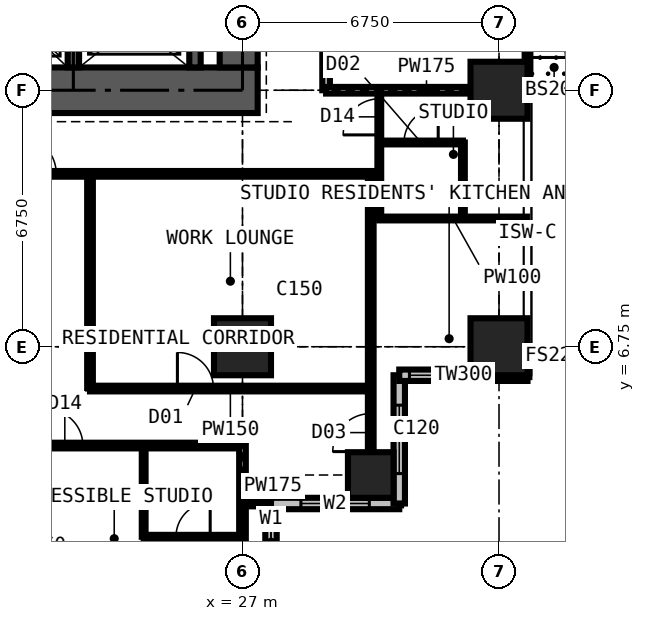
"""IFC4 building model, lengths in metres.
Left out: names, types, materials, properties, quantities, classifications, styles, units other than length and angle.
Written with IfcOpenShell. Run it as: python <this file> out.ifc"""

import sys

from ifc_helpers import new_model, si_unit, direction, frame, frame_2d, origin, origin_2d, place, context, subcontext, project, spatial, rectangle, extrude, element, fill, save


model = new_model("IFC4")
c1 = context("Model", 3, precision=1e-05, world=origin(), true_north=direction((0.0, 1.0)))
c2 = subcontext(c1, "Body", "Model", "MODEL_VIEW")
j1 = project(units=[si_unit("LENGTHUNIT", "METRE"), si_unit("PLANEANGLEUNIT", "RADIAN")], contexts=[c1])
p1 = place(None, origin())
s1 = spatial("IfcSite", under=j1, at=p1, CompositionType="ELEMENT")
p2 = place(p1, origin())
s2 = spatial("IfcBuilding", under=s1, at=p2, CompositionType="ELEMENT")
p3 = place(p2, frame((0.0, 0.0, 149.4)))
s3 = spatial("IfcBuildingStorey", under=s2, at=p3, CompositionType="ELEMENT", Elevation=149.4)
p4 = place(p3, frame((27.0, 6.75, 0.0), z_axis=(0.0, 0.0, 1.0), x_axis=(1.0, 0.0, 0.0)))
e1 = element("IfcColumn", 1, at=p4, inside=s3, PredefinedType="COLUMN", context=c2, shape_type="SweptSolid", body=[
    extrude(rectangle(XDim=1.5, YDim=1.5, at=origin_2d()), origin(), (0.0, 0.0, 1.0), 3.6),
])
p5 = place(p3, frame((30.375, 3.375, 0.0), z_axis=(0.0, 0.0, 1.0), x_axis=(1.0, 0.0, 0.0)))
e2 = element("IfcColumn", 2, at=p5, inside=s3, PredefinedType="COLUMN", context=c2, shape_type="SweptSolid", body=[
    extrude(rectangle(XDim=1.2, YDim=1.2, at=origin_2d()), origin(), (0.0, 0.0, 1.0), 3.6),
])
for number, where, z_axis, x_axis in (
    (3, (33.75, 6.75, 0.0), (0.0, 0.0, 1.0), (1.0, 0.0, 0.0)),
    (4, (33.75, 13.5, 0.0), (0.0, 0.0, 1.0), (1.0, 0.0, 0.0)),
):
    element("IfcColumn", number, at=place(p3, frame(where, z_axis=z_axis, x_axis=x_axis)), inside=s3, PredefinedType="COLUMN", context=c2, shape_type="SweptSolid", body=[
        extrude(rectangle(XDim=1.5, YDim=1.5, at=origin_2d()), origin(), (0.0, 0.0, 1.0), 3.6),
    ])
p6 = place(p3, frame((13.1, 13.5, 0.0), z_axis=(0.0, 0.0, 1.0), x_axis=(1.0, 0.0, 0.0)))
e5 = element("IfcWall", 5, at=p6, inside=s3, PredefinedType="SHEAR", context=c2, shape_type="SweptSolid", body=[
    extrude(rectangle(XDim=14.3, YDim=1.2, at=frame_2d((7.15, 0.0))), origin(), (0.0, 0.0, 1.0), 3.6),
])
p7 = place(p3, frame((26.9, 14.1, 0.0), z_axis=(0.0, 0.0, 1.0), x_axis=(0.0, 1.0, 0.0)))
e6 = element("IfcWall", 6, at=p7, inside=s3, PredefinedType="SHEAR", context=c2, shape_type="SweptSolid", body=[
    extrude(rectangle(XDim=12.3, YDim=1.0, at=frame_2d((6.15, 0.0))), origin(), (0.0, 0.0, 1.0), 3.6),
])
p8 = place(p7, frame((3.65, 0.0, 0.0)))
e7 = element("IfcOpeningElement", 7, at=p8, cuts=e6, PredefinedType="OPENING", context=c2, shape_type="SweptSolid", body=[
    extrude(rectangle(XDim=1.2, YDim=2.2, at=frame_2d((0.6, 1.1))), frame((0.0, 0.51, 0.0), z_axis=(0.0, -1.0, 0.0), x_axis=(1.0, 0.0, 0.0)), (0.0, 0.0, 1.0), 1.02),
])
p9 = place(p3, frame((34.5, 20.25, 0.0), z_axis=(0.0, 0.0, 1.0), x_axis=(0.0, -1.0, 0.0)))
e8 = element("IfcWall", 8, at=p9, inside=s3, PredefinedType="SOLIDWALL", context=c2, shape_type="SweptSolid", body=[
    extrude(rectangle(XDim=6.75, YDim=0.15, at=frame_2d((3.375, 0.0))), origin(), (0.0, 0.0, 1.0), 3.375),
])
p10 = place(p9, frame((0.863, 0.0, 0.0)))
e9 = element("IfcOpeningElement", 9, at=p10, cuts=e8, PredefinedType="OPENING", context=c2, shape_type="SweptSolid", body=[
    extrude(rectangle(XDim=1.0, YDim=2.2, at=frame_2d((0.5, 1.1))), frame((0.0, 0.085, 0.0), z_axis=(0.0, -1.0, 0.0), x_axis=(1.0, 0.0, 0.0)), (0.0, 0.0, 1.0), 0.17),
])
p11 = place(p9, frame((1.975, 0.0, 0.9)))
e10 = element("IfcOpeningElement", 10, at=p11, cuts=e8, PredefinedType="OPENING", context=c2, shape_type="SweptSolid", body=[
    extrude(rectangle(XDim=1.2, YDim=1.8, at=frame_2d((0.6, 0.9))), frame((0.0, 0.085, 0.0), z_axis=(0.0, -1.0, 0.0), x_axis=(1.0, 0.0, 0.0)), (0.0, 0.0, 1.0), 0.17),
])
p12 = place(p9, frame((4.887, 0.0, 0.0)))
e11 = element("IfcOpeningElement", 11, at=p12, cuts=e8, PredefinedType="OPENING", context=c2, shape_type="SweptSolid", body=[
    extrude(rectangle(XDim=1.0, YDim=2.2, at=frame_2d((0.5, 1.1))), frame((0.0, 0.085, 0.0), z_axis=(0.0, -1.0, 0.0), x_axis=(1.0, 0.0, 0.0)), (0.0, 0.0, 1.0), 0.17),
])
p13 = place(p9, frame((3.575, 0.0, 0.9)))
e12 = element("IfcOpeningElement", 12, at=p13, cuts=e8, PredefinedType="OPENING", context=c2, shape_type="SweptSolid", body=[
    extrude(rectangle(XDim=1.2, YDim=1.8, at=frame_2d((0.6, 0.9))), frame((0.0, 0.085, 0.0), z_axis=(0.0, -1.0, 0.0), x_axis=(1.0, 0.0, 0.0)), (0.0, 0.0, 1.0), 0.17),
])
p14 = place(p3, frame((27.75, -0.75, 0.0), z_axis=(0.0, 0.0, 1.0), x_axis=(0.0, 1.0, 0.0)))
e13 = element("IfcWall", 13, at=p14, inside=s3, PredefinedType="SOLIDWALL", context=c2, shape_type="SweptSolid", body=[
    extrude(rectangle(XDim=3.375, YDim=0.3, at=frame_2d((1.688, 0.0))), origin(), (0.0, 0.0, 1.0), 3.375),
])
p15 = place(p14, frame((1.607, 0.0, 0.9)))
e14 = element("IfcOpeningElement", 14, at=p15, cuts=e13, PredefinedType="OPENING", context=c2, shape_type="SweptSolid", body=[
    extrude(rectangle(XDim=1.5, YDim=1.8, at=frame_2d((0.75, 0.9))), frame((0.0, 0.16, 0.0), z_axis=(0.0, -1.0, 0.0), x_axis=(1.0, 0.0, 0.0)), (0.0, 0.0, 1.0), 0.32),
])
p16 = place(p3, frame((27.75, 2.625, 0.0), z_axis=(0.0, 0.0, 1.0), x_axis=(1.0, 0.0, 0.0)))
e15 = element("IfcWall", 15, at=p16, inside=s3, PredefinedType="SOLIDWALL", context=c2, shape_type="SweptSolid", body=[
    extrude(rectangle(XDim=3.375, YDim=0.3, at=frame_2d((1.688, 0.0))), origin(), (0.0, 0.0, 1.0), 3.375),
])
p17 = place(p16, frame((0.788, 0.0, 0.6)))
e16 = element("IfcOpeningElement", 16, at=p17, cuts=e15, PredefinedType="OPENING", context=c2, shape_type="SweptSolid", body=[
    extrude(rectangle(XDim=1.8, YDim=2.1, at=frame_2d((0.9, 1.05))), frame((0.0, 0.16, 0.0), z_axis=(0.0, -1.0, 0.0), x_axis=(1.0, 0.0, 0.0)), (0.0, 0.0, 1.0), 0.32),
])
p18 = place(p3, frame((31.125, 2.625, 0.0), z_axis=(0.0, 0.0, 1.0), x_axis=(0.0, 1.0, 0.0)))
e17 = element("IfcWall", 17, at=p18, inside=s3, PredefinedType="SOLIDWALL", context=c2, shape_type="SweptSolid", body=[
    extrude(rectangle(XDim=3.375, YDim=0.3, at=frame_2d((1.688, 0.0))), origin(), (0.0, 0.0, 1.0), 3.375),
])
p19 = place(p18, frame((0.788, 0.0, 0.6)))
e18 = element("IfcOpeningElement", 18, at=p19, cuts=e17, PredefinedType="OPENING", context=c2, shape_type="SweptSolid", body=[
    extrude(rectangle(XDim=1.8, YDim=2.1, at=frame_2d((0.9, 1.05))), frame((0.0, 0.16, 0.0), z_axis=(0.0, -1.0, 0.0), x_axis=(1.0, 0.0, 0.0)), (0.0, 0.0, 1.0), 0.32),
])
p20 = place(p3, frame((31.125, 6.0, 0.0), z_axis=(0.0, 0.0, 1.0), x_axis=(1.0, 0.0, 0.0)))
e19 = element("IfcWall", 19, at=p20, inside=s3, PredefinedType="SOLIDWALL", context=c2, shape_type="SweptSolid", body=[
    extrude(rectangle(XDim=3.375, YDim=0.3, at=frame_2d((1.688, 0.0))), origin(), (0.0, 0.0, 1.0), 3.375),
])
p21 = place(p20, frame((0.268, 0.0, 0.9)))
e20 = element("IfcOpeningElement", 20, at=p21, cuts=e19, PredefinedType="OPENING", context=c2, shape_type="SweptSolid", body=[
    extrude(rectangle(XDim=1.5, YDim=1.8, at=frame_2d((0.75, 0.9))), frame((0.0, 0.16, 0.0), z_axis=(0.0, -1.0, 0.0), x_axis=(1.0, 0.0, 0.0)), (0.0, 0.0, 1.0), 0.32),
])
for number, where, z_axis, x_axis in (
    (21, (22.55, 14.1, 0.0), (0.0, 0.0, 1.0), (0.0, 1.0, 0.0)),
    (22, (25.75, 14.1, 0.0), (0.0, 0.0, 1.0), (0.0, 1.0, 0.0)),
):
    element("IfcWall", number, at=place(p3, frame(where, z_axis=z_axis, x_axis=x_axis)), inside=s3, PredefinedType="SHEAR", context=c2, shape_type="SweptSolid", body=[
        extrude(rectangle(XDim=2.3, YDim=0.3, at=frame_2d((1.15, 0.0))), origin(), (0.0, 0.0, 1.0), 3.6),
    ])
p22 = place(p3, frame((6.75, 4.15, 0.0), z_axis=(0.0, 0.0, 1.0), x_axis=(1.0, 0.0, 0.0)))
e23 = element("IfcWall", 23, at=p22, inside=s3, PredefinedType="PARTITIONING", context=c2, shape_type="SweptSolid", body=[
    extrude(rectangle(XDim=20.25, YDim=0.15, at=frame_2d((10.125, 0.0))), origin(), (0.0, 0.0, 1.0), 3.375),
])
p23 = place(p22, frame((1.2, 0.0, 0.0)))
e24 = element("IfcOpeningElement", 24, at=p23, cuts=e23, PredefinedType="OPENING", context=c2, shape_type="SweptSolid", body=[
    extrude(rectangle(XDim=1.0, YDim=2.2, at=frame_2d((0.5, 1.1))), frame((0.0, 0.085, 0.0), z_axis=(0.0, -1.0, 0.0), x_axis=(1.0, 0.0, 0.0)), (0.0, 0.0, 1.0), 0.17),
])
p24 = place(p22, frame((3.575, 0.0, 0.0)))
e25 = element("IfcOpeningElement", 25, at=p24, cuts=e23, PredefinedType="OPENING", context=c2, shape_type="SweptSolid", body=[
    extrude(rectangle(XDim=0.95, YDim=2.2, at=frame_2d((0.475, 1.1))), frame((0.0, 0.085, 0.0), z_axis=(0.0, -1.0, 0.0), x_axis=(1.0, 0.0, 0.0)), (0.0, 0.0, 1.0), 0.17),
])
p25 = place(p22, frame((7.0, 0.0, 0.0)))
e26 = element("IfcOpeningElement", 26, at=p25, cuts=e23, PredefinedType="OPENING", context=c2, shape_type="SweptSolid", body=[
    extrude(rectangle(XDim=0.95, YDim=2.2, at=frame_2d((0.475, 1.1))), frame((0.0, 0.085, 0.0), z_axis=(0.0, -1.0, 0.0), x_axis=(1.0, 0.0, 0.0)), (0.0, 0.0, 1.0), 0.17),
])
p26 = place(p22, frame((10.375, 0.0, 0.0)))
e27 = element("IfcOpeningElement", 27, at=p26, cuts=e23, PredefinedType="OPENING", context=c2, shape_type="SweptSolid", body=[
    extrude(rectangle(XDim=0.95, YDim=2.2, at=frame_2d((0.475, 1.1))), frame((0.0, 0.085, 0.0), z_axis=(0.0, -1.0, 0.0), x_axis=(1.0, 0.0, 0.0)), (0.0, 0.0, 1.0), 0.17),
])
p27 = place(p22, frame((15.1, 0.0, 0.0)))
e28 = element("IfcOpeningElement", 28, at=p27, cuts=e23, PredefinedType="OPENING", context=c2, shape_type="SweptSolid", body=[
    extrude(rectangle(XDim=0.95, YDim=2.2, at=frame_2d((0.475, 1.1))), frame((0.0, 0.085, 0.0), z_axis=(0.0, -1.0, 0.0), x_axis=(1.0, 0.0, 0.0)), (0.0, 0.0, 1.0), 0.17),
])
p28 = place(p3, frame((10.125, 11.3, 0.0), z_axis=(0.0, 0.0, 1.0), x_axis=(1.0, 0.0, 0.0)))
e29 = element("IfcWall", 29, at=p28, inside=s3, PredefinedType="PARTITIONING", context=c2, shape_type="SweptSolid", body=[
    extrude(rectangle(XDim=20.475, YDim=0.15, at=frame_2d((10.238, 0.0))), origin(), (0.0, 0.0, 1.0), 3.375),
])
p29 = place(p28, frame((8.425, 0.0, 0.0)))
e30 = element("IfcOpeningElement", 30, at=p29, cuts=e29, PredefinedType="OPENING", context=c2, shape_type="SweptSolid", body=[
    extrude(rectangle(XDim=1.0, YDim=2.2, at=frame_2d((0.5, 1.1))), frame((0.0, 0.085, 0.0), z_axis=(0.0, -1.0, 0.0), x_axis=(1.0, 0.0, 0.0)), (0.0, 0.0, 1.0), 0.17),
])
p30 = place(p28, frame((10.975, 0.0, 0.0)))
e31 = element("IfcOpeningElement", 31, at=p30, cuts=e29, PredefinedType="OPENING", context=c2, shape_type="SweptSolid", body=[
    extrude(rectangle(XDim=1.0, YDim=2.2, at=frame_2d((0.5, 1.1))), frame((0.0, 0.085, 0.0), z_axis=(0.0, -1.0, 0.0), x_axis=(1.0, 0.0, 0.0)), (0.0, 0.0, 1.0), 0.17),
])
p31 = place(p28, frame((4.875, 0.0, 0.0)))
e32 = element("IfcOpeningElement", 32, at=p31, cuts=e29, PredefinedType="OPENING", context=c2, shape_type="SweptSolid", body=[
    extrude(rectangle(XDim=0.95, YDim=2.2, at=frame_2d((0.475, 1.1))), frame((0.0, 0.085, 0.0), z_axis=(0.0, -1.0, 0.0), x_axis=(1.0, 0.0, 0.0)), (0.0, 0.0, 1.0), 0.17),
])
p32 = place(p3, frame((22.988, 5.65, 0.0), z_axis=(0.0, 0.0, 1.0), x_axis=(1.0, 0.0, 0.0)))
e33 = element("IfcWall", 33, at=p32, inside=s3, PredefinedType="PARTITIONING", context=c2, shape_type="SweptSolid", body=[
    extrude(rectangle(XDim=7.387, YDim=0.15, at=frame_2d((3.694, 0.0))), origin(), (0.0, 0.0, 1.0), 3.375),
])
p33 = place(p32, frame((2.3, 0.0, 0.0)))
e34 = element("IfcOpeningElement", 34, at=p33, cuts=e33, PredefinedType="OPENING", context=c2, shape_type="SweptSolid", body=[
    extrude(rectangle(XDim=0.95, YDim=2.2, at=frame_2d((0.475, 1.1))), frame((0.0, 0.085, 0.0), z_axis=(0.0, -1.0, 0.0), x_axis=(1.0, 0.0, 0.0)), (0.0, 0.0, 1.0), 0.17),
])
p34 = place(p3, frame((22.988, 5.65, 0.0), z_axis=(0.0, 0.0, 1.0), x_axis=(0.0, 1.0, 0.0)))
e35 = element("IfcWall", 35, at=p34, inside=s3, PredefinedType="PARTITIONING", context=c2, shape_type="SweptSolid", body=[
    extrude(rectangle(XDim=5.65, YDim=0.15, at=frame_2d((2.825, 0.0))), origin(), (0.0, 0.0, 1.0), 3.375),
])
p35 = place(p3, frame((24.4, 1.75, 0.0), z_axis=(0.0, 0.0, 1.0), x_axis=(0.0, 1.0, 0.0)))
e36 = element("IfcWall", 36, at=p35, inside=s3, PredefinedType="PARTITIONING", context=c2, shape_type="SweptSolid", body=[
    extrude(rectangle(XDim=2.4, YDim=0.1, at=frame_2d((1.2, 0.0))), origin(), (0.0, 0.0, 1.0), 3.375),
])
p36 = place(p3, frame((24.4, 1.75, 0.0), z_axis=(0.0, 0.0, 1.0), x_axis=(1.0, 0.0, 0.0)))
e37 = element("IfcWall", 37, at=p36, inside=s3, PredefinedType="PARTITIONING", context=c2, shape_type="SweptSolid", body=[
    extrude(rectangle(XDim=2.6, YDim=0.1, at=frame_2d((1.3, 0.0))), origin(), (0.0, 0.0, 1.0), 3.375),
])
p37 = place(p36, frame((0.85, 0.0, 0.0)))
e38 = element("IfcOpeningElement", 38, at=p37, cuts=e37, PredefinedType="OPENING", context=c2, shape_type="SweptSolid", body=[
    extrude(rectangle(XDim=0.9, YDim=2.2, at=frame_2d((0.45, 1.1))), frame((0.0, 0.06, 0.0), z_axis=(0.0, -1.0, 0.0), x_axis=(1.0, 0.0, 0.0)), (0.0, 0.0, 1.0), 0.12),
])
p38 = place(p3, frame((27.0, -0.734, 0.0), z_axis=(0.0, 0.0, 1.0), x_axis=(0.0, 1.0, 0.0)))
e39 = element("IfcWall", 39, at=p38, inside=s3, PredefinedType="PARTITIONING", context=c2, shape_type="SweptSolid", body=[
    extrude(rectangle(XDim=4.884, YDim=0.175, at=frame_2d((2.442, 0.0))), origin(), (0.0, 0.0, 1.0), 2.877),
])
p39 = place(p3, frame((27.0, 2.625, 0.0), z_axis=(0.0, 0.0, 1.0), x_axis=(1.0, 0.0, 0.0)))
e40 = element("IfcWall", 40, at=p39, inside=s3, PredefinedType="PARTITIONING", context=c2, shape_type="SweptSolid", body=[
    extrude(rectangle(XDim=0.734, YDim=0.15, at=frame_2d((0.367, 0.0))), origin(), (0.0, 0.0, 1.0), 3.375),
])
p40 = place(p3, frame((29.2, 13.5, 0.0), z_axis=(0.0, 0.0, 1.0), x_axis=(0.0, 1.0, 0.0)))
e41 = element("IfcWall", 41, at=p40, inside=s3, PredefinedType="PARTITIONING", context=c2, shape_type="SweptSolid", body=[
    extrude(rectangle(XDim=15.7, YDim=0.2, at=frame_2d((7.85, 0.0))), origin(), (0.0, 0.0, 1.0), 3.375),
])
p41 = place(p40, frame((8.35, 0.0, 0.0)))
e42 = element("IfcOpeningElement", 42, at=p41, cuts=e41, PredefinedType="OPENING", context=c2, shape_type="SweptSolid", body=[
    extrude(rectangle(XDim=0.95, YDim=2.2, at=frame_2d((0.475, 1.1))), frame((0.0, 0.11, 0.0), z_axis=(0.0, -1.0, 0.0), x_axis=(1.0, 0.0, 0.0)), (0.0, 0.0, 1.0), 0.22),
])
p42 = place(p40, frame((1.6, 0.0, 0.0)))
e43 = element("IfcOpeningElement", 43, at=p42, cuts=e41, PredefinedType="OPENING", context=c2, shape_type="SweptSolid", body=[
    extrude(rectangle(XDim=0.95, YDim=2.2, at=frame_2d((0.475, 1.1))), frame((0.0, 0.11, 0.0), z_axis=(0.0, -1.0, 0.0), x_axis=(1.0, 0.0, 0.0)), (0.0, 0.0, 1.0), 0.22),
])
p43 = place(p40, frame((14.1, 0.0, 0.0)))
e44 = element("IfcOpeningElement", 44, at=p43, cuts=e41, PredefinedType="OPENING", context=c2, shape_type="SweptSolid", body=[
    extrude(rectangle(XDim=1.0, YDim=2.2, at=frame_2d((0.5, 1.1))), frame((0.0, 0.11, 0.0), z_axis=(0.0, -1.0, 0.0), x_axis=(1.0, 0.0, 0.0)), (0.0, 0.0, 1.0), 0.22),
])
p44 = place(p3, frame((29.2, 13.5, 0.0), z_axis=(0.0, 0.0, 1.0), x_axis=(1.0, 0.0, 0.0)))
e45 = element("IfcWall", 45, at=p44, inside=s3, PredefinedType="PARTITIONING", context=c2, shape_type="SweptSolid", body=[
    extrude(rectangle(XDim=5.284, YDim=0.175, at=frame_2d((2.642, 0.0))), origin(), (0.0, 0.0, 1.0), 2.806),
])
p45 = place(p3, frame((30.375, 2.775, 0.0), z_axis=(0.0, 0.0, 1.0), x_axis=(0.0, 1.0, 0.0)))
e46 = element("IfcWall", 46, at=p45, inside=s3, PredefinedType="PARTITIONING", context=c2, shape_type="SweptSolid", body=[
    extrude(rectangle(XDim=8.525, YDim=0.15, at=frame_2d((4.263, 0.0))), origin(), (0.0, 0.0, 1.0), 2.877),
])
p46 = place(p45, frame((1.216, 0.0, 0.0)))
e47 = element("IfcOpeningElement", 47, at=p46, cuts=e46, PredefinedType="OPENING", context=c2, shape_type="SweptSolid", body=[
    extrude(rectangle(XDim=1.0, YDim=2.2, at=frame_2d((0.5, 1.1))), frame((0.0, 0.085, 0.0), z_axis=(0.0, -1.0, 0.0), x_axis=(1.0, 0.0, 0.0)), (0.0, 0.0, 1.0), 0.17),
])
p47 = place(p3, frame((30.6, 10.125, 0.0), z_axis=(0.0, 0.0, 1.0), x_axis=(0.0, 1.0, 0.0)))
e48 = element("IfcWall", 48, at=p47, inside=s3, PredefinedType="PARTITIONING", context=c2, shape_type="SweptSolid", body=[
    extrude(rectangle(XDim=3.375, YDim=0.1, at=frame_2d((1.688, 0.0))), origin(), (0.0, 0.0, 1.0), 3.375),
])
p48 = place(p47, frame((2.2, 0.0, 0.0)))
e49 = element("IfcOpeningElement", 49, at=p48, cuts=e48, PredefinedType="OPENING", context=c2, shape_type="SweptSolid", body=[
    extrude(rectangle(XDim=0.95, YDim=2.2, at=frame_2d((0.475, 1.1))), frame((0.0, 0.06, 0.0), z_axis=(0.0, -1.0, 0.0), x_axis=(1.0, 0.0, 0.0)), (0.0, 0.0, 1.0), 0.12),
])
p49 = place(p3, frame((30.6, 10.125, 0.0), z_axis=(0.0, 0.0, 1.0), x_axis=(1.0, 0.0, 0.0)))
e50 = element("IfcWall", 50, at=p49, inside=s3, PredefinedType="PARTITIONING", context=c2, shape_type="SweptSolid", body=[
    extrude(rectangle(XDim=3.884, YDim=0.1, at=frame_2d((1.942, 0.0))), origin(), (0.0, 0.0, 1.0), 3.375),
])
p50 = place(p3, frame((30.6, 12.125, 0.0), z_axis=(0.0, 0.0, 1.0), x_axis=(1.0, 0.0, 0.0)))
e51 = element("IfcWall", 51, at=p50, inside=s3, PredefinedType="PARTITIONING", context=c2, shape_type="SweptSolid", body=[
    extrude(rectangle(XDim=2.2, YDim=0.1, at=frame_2d((1.1, 0.0))), origin(), (0.0, 0.0, 1.0), 3.375),
])
p51 = place(p50, frame((0.65, 0.0, 0.0)))
e52 = element("IfcOpeningElement", 52, at=p51, cuts=e51, PredefinedType="OPENING", context=c2, shape_type="SweptSolid", body=[
    extrude(rectangle(XDim=0.9, YDim=2.2, at=frame_2d((0.45, 1.1))), frame((0.0, 0.06, 0.0), z_axis=(0.0, -1.0, 0.0), x_axis=(1.0, 0.0, 0.0)), (0.0, 0.0, 1.0), 0.12),
])
p52 = place(p3, frame((32.8, 10.125, 0.0), z_axis=(0.0, 0.0, 1.0), x_axis=(0.0, 1.0, 0.0)))
e53 = element("IfcWall", 53, at=p52, inside=s3, PredefinedType="PARTITIONING", context=c2, shape_type="SweptSolid", body=[
    extrude(rectangle(XDim=2.0, YDim=0.1, at=frame_2d((1.0, 0.0))), origin(), (0.0, 0.0, 1.0), 3.375),
])
p53 = place(p12, origin())
e54 = element("IfcDoor", 54, at=p53, inside=s3, OperationType="SINGLE_SWING_RIGHT", PredefinedType="DOOR", context=c2, shape_type="SweptSolid", body=[
    extrude(rectangle(XDim=1.0, YDim=2.2, at=frame_2d((0.5, 1.1))), frame((0.0, 0.025, 0.0), z_axis=(0.0, -1.0, 0.0), x_axis=(1.0, 0.0, 0.0)), (0.0, 0.0, 1.0), 0.05),
])
fill(e11, e54)
p54 = place(p15, origin())
e55 = element("IfcWindow", 55, at=p54, inside=s3, PartitioningType="SINGLE_PANEL", PredefinedType="WINDOW", context=c2, shape_type="SweptSolid", body=[
    extrude(rectangle(XDim=1.5, YDim=1.8, at=frame_2d((0.75, 0.9))), frame((0.0, 0.03, 0.0), z_axis=(0.0, -1.0, 0.0), x_axis=(1.0, 0.0, 0.0)), (0.0, 0.0, 1.0), 0.06),
])
fill(e14, e55)
p55 = place(p17, origin())
e56 = element("IfcWindow", 56, at=p55, inside=s3, PartitioningType="SINGLE_PANEL", PredefinedType="WINDOW", context=c2, shape_type="SweptSolid", body=[
    extrude(rectangle(XDim=1.8, YDim=2.1, at=frame_2d((0.9, 1.05))), frame((0.0, 0.03, 0.0), z_axis=(0.0, -1.0, 0.0), x_axis=(1.0, 0.0, 0.0)), (0.0, 0.0, 1.0), 0.06),
])
fill(e16, e56)
p56 = place(p19, origin())
e57 = element("IfcWindow", 57, at=p56, inside=s3, PartitioningType="SINGLE_PANEL", PredefinedType="WINDOW", context=c2, shape_type="SweptSolid", body=[
    extrude(rectangle(XDim=1.8, YDim=2.1, at=frame_2d((0.9, 1.05))), frame((0.0, 0.03, 0.0), z_axis=(0.0, -1.0, 0.0), x_axis=(1.0, 0.0, 0.0)), (0.0, 0.0, 1.0), 0.06),
])
fill(e18, e57)
p57 = place(p21, origin())
e58 = element("IfcWindow", 58, at=p57, inside=s3, PartitioningType="SINGLE_PANEL", PredefinedType="WINDOW", context=c2, shape_type="SweptSolid", body=[
    extrude(rectangle(XDim=1.5, YDim=1.8, at=frame_2d((0.75, 0.9))), frame((0.0, 0.03, 0.0), z_axis=(0.0, -1.0, 0.0), x_axis=(1.0, 0.0, 0.0)), (0.0, 0.0, 1.0), 0.06),
])
fill(e20, e58)
p58 = place(p27, origin())
e59 = element("IfcDoor", 59, at=p58, inside=s3, OperationType="SINGLE_SWING_LEFT", PredefinedType="DOOR", context=c2, shape_type="SweptSolid", body=[
    extrude(rectangle(XDim=0.95, YDim=2.2, at=frame_2d((0.475, 1.1))), frame((0.0, 0.025, 0.0), z_axis=(0.0, -1.0, 0.0), x_axis=(1.0, 0.0, 0.0)), (0.0, 0.0, 1.0), 0.05),
])
fill(e28, e59)
p59 = place(p37, origin())
e60 = element("IfcDoor", 60, at=p59, inside=s3, OperationType="SINGLE_SWING_RIGHT", PredefinedType="DOOR", context=c2, shape_type="SweptSolid", body=[
    extrude(rectangle(XDim=0.9, YDim=2.2, at=frame_2d((0.45, 1.1))), frame((0.0, 0.025, 0.0), z_axis=(0.0, -1.0, 0.0), x_axis=(1.0, 0.0, 0.0)), (0.0, 0.0, 1.0), 0.05),
])
fill(e38, e60)
p60 = place(p30, origin())
e61 = element("IfcDoor", 61, at=p60, inside=s3, OperationType="SINGLE_SWING_LEFT", PredefinedType="DOOR", context=c2, shape_type="SweptSolid", body=[
    extrude(rectangle(XDim=1.0, YDim=2.2, at=frame_2d((0.5, 1.1))), frame((0.0, 0.025, 0.0), z_axis=(0.0, -1.0, 0.0), x_axis=(1.0, 0.0, 0.0)), (0.0, 0.0, 1.0), 0.05),
])
fill(e31, e61)
p61 = place(p33, origin())
e62 = element("IfcDoor", 62, at=p61, inside=s3, OperationType="SINGLE_SWING_LEFT", PredefinedType="DOOR", context=c2, shape_type="SweptSolid", body=[
    extrude(rectangle(XDim=0.95, YDim=2.2, at=frame_2d((0.475, 1.1))), frame((0.0, 0.025, 0.0), z_axis=(0.0, -1.0, 0.0), x_axis=(1.0, 0.0, 0.0)), (0.0, 0.0, 1.0), 0.05),
])
fill(e34, e62)
p62 = place(p46, origin())
e63 = element("IfcDoor", 63, at=p62, inside=s3, OperationType="SINGLE_SWING_LEFT", PredefinedType="DOOR", context=c2, shape_type="SweptSolid", body=[
    extrude(rectangle(XDim=1.0, YDim=2.2, at=frame_2d((0.5, 1.1))), frame((0.0, 0.025, 0.0), z_axis=(0.0, -1.0, 0.0), x_axis=(1.0, 0.0, 0.0)), (0.0, 0.0, 1.0), 0.05),
])
fill(e47, e63)
p63 = place(p48, origin())
e64 = element("IfcDoor", 64, at=p63, inside=s3, OperationType="SINGLE_SWING_LEFT", PredefinedType="DOOR", context=c2, shape_type="SweptSolid", body=[
    extrude(rectangle(XDim=0.95, YDim=2.2, at=frame_2d((0.475, 1.1))), frame((0.0, 0.025, 0.0), z_axis=(0.0, -1.0, 0.0), x_axis=(1.0, 0.0, 0.0)), (0.0, 0.0, 1.0), 0.05),
])
fill(e49, e64)
p64 = place(p51, origin())
e65 = element("IfcDoor", 65, at=p64, inside=s3, OperationType="SINGLE_SWING_RIGHT", PredefinedType="DOOR", context=c2, shape_type="SweptSolid", body=[
    extrude(rectangle(XDim=0.9, YDim=2.2, at=frame_2d((0.45, 1.1))), frame((0.0, 0.025, 0.0), z_axis=(0.0, -1.0, 0.0), x_axis=(1.0, 0.0, 0.0)), (0.0, 0.0, 1.0), 0.05),
])
fill(e52, e65)
save(model, sys.argv[1])
